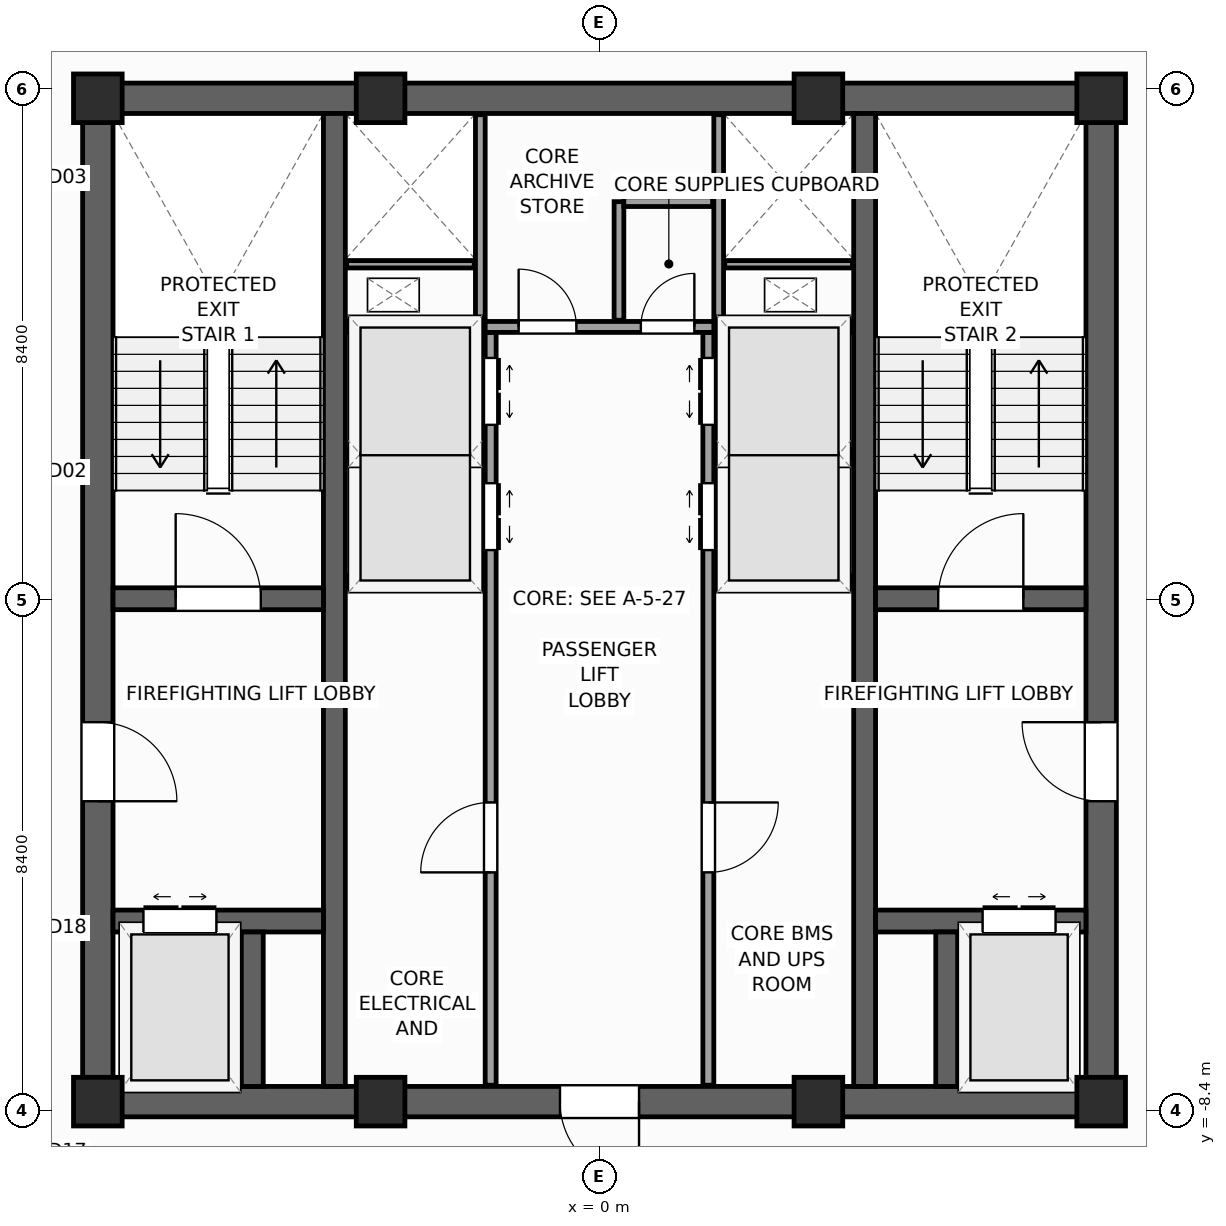
"""IFC4 building model, lengths in metres.
Left out: names, types, materials, properties, quantities, classifications, styles, units other than length and angle.
Written with IfcOpenShell. Run it as: python <this file> out.ifc"""

import sys

from ifc_helpers import new_model, si_unit, direction, frame, frame_2d, origin, origin_2d, place, context, subcontext, project, spatial, rectangle, extrude, source, transform, mapped, element, fill, save


model = new_model("IFC4")
c1 = context("Model", 3, precision=1e-05, world=origin(), true_north=direction((0.0, 1.0)))
c2 = subcontext(c1, "Body", "Model", "MODEL_VIEW")
j1 = project(units=[si_unit("LENGTHUNIT", "METRE"), si_unit("PLANEANGLEUNIT", "RADIAN")], contexts=[c1])
p1 = place(None, origin())
s1 = spatial("IfcSite", under=j1, at=p1, CompositionType="ELEMENT")
p2 = place(p1, origin())
s2 = spatial("IfcBuilding", under=s1, at=p2, CompositionType="ELEMENT")
p3 = place(p2, frame((0.0, 0.0, 265.2)))
s3 = spatial("IfcBuildingStorey", under=s2, at=p3, CompositionType="ELEMENT", Elevation=265.2)
p4 = place(p3, frame((-8.5, -8.25, 0.0), z_axis=(0.0, 0.0, 1.0), x_axis=(1.0, 0.0, 0.0)))
e1 = element("IfcWall", 1, at=p4, inside=s3, PredefinedType="SHEAR", context=c2, shape_type="SweptSolid", body=[
    extrude(rectangle(XDim=17.0, YDim=0.5, at=frame_2d((8.5, 0.0))), origin(), (0.0, 0.0, 1.0), 3.6),
])
p5 = place(p4, frame((7.85, 0.0, 0.0)))
e2 = element("IfcOpeningElement", 2, at=p5, cuts=e1, PredefinedType="OPENING", context=c2, shape_type="SweptSolid", body=[
    extrude(rectangle(XDim=1.3, YDim=2.2, at=frame_2d((0.65, 1.1))), frame((0.0, 0.26, 0.0), z_axis=(0.0, -1.0, 0.0), x_axis=(1.0, 0.0, 0.0)), (0.0, 0.0, 1.0), 0.52),
])
p6 = place(p3, frame((-8.5, 8.25, 0.0), z_axis=(0.0, 0.0, 1.0), x_axis=(1.0, 0.0, 0.0)))
e3 = element("IfcWall", 3, at=p6, inside=s3, PredefinedType="SHEAR", context=c2, shape_type="SweptSolid", body=[
    extrude(rectangle(XDim=17.0, YDim=0.5, at=frame_2d((8.5, 0.0))), origin(), (0.0, 0.0, 1.0), 3.6),
])
p7 = place(p3, frame((-8.25, -8.0, 0.0), z_axis=(0.0, 0.0, 1.0), x_axis=(0.0, 1.0, 0.0)))
e4 = element("IfcWall", 4, at=p7, inside=s3, PredefinedType="SHEAR", context=c2, shape_type="SweptSolid", body=[
    extrude(rectangle(XDim=16.0, YDim=0.5, at=frame_2d((8.0, 0.0))), origin(), (0.0, 0.0, 1.0), 3.6),
])
p8 = place(p7, frame((4.69, 0.0, 0.0)))
e5 = element("IfcOpeningElement", 5, at=p8, cuts=e4, PredefinedType="OPENING", context=c2, shape_type="SweptSolid", body=[
    extrude(rectangle(XDim=1.3, YDim=2.2, at=frame_2d((0.65, 1.1))), frame((0.0, 0.26, 0.0), z_axis=(0.0, -1.0, 0.0), x_axis=(1.0, 0.0, 0.0)), (0.0, 0.0, 1.0), 0.52),
])
p9 = place(p3, frame((8.25, -8.0, 0.0), z_axis=(0.0, 0.0, 1.0), x_axis=(0.0, 1.0, 0.0)))
e6 = element("IfcWall", 6, at=p9, inside=s3, PredefinedType="SHEAR", context=c2, shape_type="SweptSolid", body=[
    extrude(rectangle(XDim=16.0, YDim=0.5, at=frame_2d((8.0, 0.0))), origin(), (0.0, 0.0, 1.0), 3.6),
])
p10 = place(p9, frame((4.69, 0.0, 0.0)))
e7 = element("IfcOpeningElement", 7, at=p10, cuts=e6, PredefinedType="OPENING", context=c2, shape_type="SweptSolid", body=[
    extrude(rectangle(XDim=1.3, YDim=2.2, at=frame_2d((0.65, 1.1))), frame((0.0, 0.26, 0.0), z_axis=(0.0, -1.0, 0.0), x_axis=(1.0, 0.0, 0.0)), (0.0, 0.0, 1.0), 0.52),
])
for number, where, z_axis, x_axis in (
    (8, (-4.36, -8.0, 0.0), (0.0, 0.0, 1.0), (0.0, 1.0, 0.0)),
    (9, (4.36, -8.0, 0.0), (0.0, 0.0, 1.0), (0.0, 1.0, 0.0)),
):
    element("IfcWall", number, at=place(p3, frame(where, z_axis=z_axis, x_axis=x_axis)), inside=s3, PredefinedType="SHEAR", context=c2, shape_type="SweptSolid", body=[
        extrude(rectangle(XDim=16.0, YDim=0.36, at=frame_2d((8.0, 0.0))), origin(), (0.0, 0.0, 1.0), 3.6),
    ])
p11 = place(p3, frame((-8.0, 0.02, 0.0), z_axis=(0.0, 0.0, 1.0), x_axis=(1.0, 0.0, 0.0)))
e10 = element("IfcWall", 10, at=p11, inside=s3, PredefinedType="SHEAR", context=c2, shape_type="SweptSolid", body=[
    extrude(rectangle(XDim=3.46, YDim=0.36, at=frame_2d((1.73, 0.0))), origin(), (0.0, 0.0, 1.0), 3.6),
])
p12 = place(p11, frame((1.03, 0.0, 0.0)))
e11 = element("IfcOpeningElement", 11, at=p12, cuts=e10, PredefinedType="OPENING", context=c2, shape_type="SweptSolid", body=[
    extrude(rectangle(XDim=1.4, YDim=2.2, at=frame_2d((0.7, 1.1))), frame((0.0, 0.19, 0.0), z_axis=(0.0, -1.0, 0.0), x_axis=(1.0, 0.0, 0.0)), (0.0, 0.0, 1.0), 0.38),
])
p13 = place(p3, frame((4.54, 0.02, 0.0), z_axis=(0.0, 0.0, 1.0), x_axis=(1.0, 0.0, 0.0)))
e12 = element("IfcWall", 12, at=p13, inside=s3, PredefinedType="SHEAR", context=c2, shape_type="SweptSolid", body=[
    extrude(rectangle(XDim=3.46, YDim=0.36, at=frame_2d((1.73, 0.0))), origin(), (0.0, 0.0, 1.0), 3.6),
])
p14 = place(p13, frame((1.03, 0.0, 0.0)))
e13 = element("IfcOpeningElement", 13, at=p14, cuts=e12, PredefinedType="OPENING", context=c2, shape_type="SweptSolid", body=[
    extrude(rectangle(XDim=1.4, YDim=2.2, at=frame_2d((0.7, 1.1))), frame((0.0, 0.19, 0.0), z_axis=(0.0, -1.0, 0.0), x_axis=(1.0, 0.0, 0.0)), (0.0, 0.0, 1.0), 0.38),
])
p15 = place(p3, frame((-8.0, -5.28, 0.0), z_axis=(0.0, 0.0, 1.0), x_axis=(1.0, 0.0, 0.0)))
e14 = element("IfcWall", 14, at=p15, inside=s3, PredefinedType="SHEAR", context=c2, shape_type="SweptSolid", body=[
    extrude(rectangle(XDim=3.46, YDim=0.36, at=frame_2d((1.73, 0.0))), origin(), (0.0, 0.0, 1.0), 3.6),
])
p16 = place(p15, frame((0.5, 0.0, 0.0)))
e15 = element("IfcOpeningElement", 15, at=p16, cuts=e14, PredefinedType="OPENING", context=c2, shape_type="SweptSolid", body=[
    extrude(rectangle(XDim=1.2, YDim=2.25, at=frame_2d((0.6, 1.125))), frame((0.0, 0.19, 0.0), z_axis=(0.0, -1.0, 0.0), x_axis=(1.0, 0.0, 0.0)), (0.0, 0.0, 1.0), 0.38),
])
p17 = place(p3, frame((4.54, -5.28, 0.0), z_axis=(0.0, 0.0, 1.0), x_axis=(1.0, 0.0, 0.0)))
e16 = element("IfcWall", 16, at=p17, inside=s3, PredefinedType="SHEAR", context=c2, shape_type="SweptSolid", body=[
    extrude(rectangle(XDim=3.46, YDim=0.36, at=frame_2d((1.73, 0.0))), origin(), (0.0, 0.0, 1.0), 3.6),
])
p18 = place(p17, frame((1.76, 0.0, 0.0)))
e17 = element("IfcOpeningElement", 17, at=p18, cuts=e16, PredefinedType="OPENING", context=c2, shape_type="SweptSolid", body=[
    extrude(rectangle(XDim=1.2, YDim=2.25, at=frame_2d((0.6, 1.125))), frame((0.0, 0.19, 0.0), z_axis=(0.0, -1.0, 0.0), x_axis=(1.0, 0.0, 0.0)), (0.0, 0.0, 1.0), 0.38),
])
for number, where, z_axis, x_axis in (
    (18, (-5.71, -8.0, 0.0), (0.0, 0.0, 1.0), (0.0, 1.0, 0.0)),
    (19, (5.71, -8.0, 0.0), (0.0, 0.0, 1.0), (0.0, 1.0, 0.0)),
):
    element("IfcWall", number, at=place(p3, frame(where, z_axis=z_axis, x_axis=x_axis)), inside=s3, PredefinedType="SHEAR", context=c2, shape_type="SweptSolid", body=[
        extrude(rectangle(XDim=2.54, YDim=0.36, at=frame_2d((1.27, 0.0))), origin(), (0.0, 0.0, 1.0), 3.6),
    ])
m1 = source(origin(), c2, "Body", "SweptSolid", [
    extrude(rectangle(XDim=0.8, YDim=0.8, at=origin_2d()), origin(), (0.0, 0.0, 1.0), 3.6),
])
for number, where, z_axis, x_axis in (
    (20, (-8.25, -8.25, 0.0), (0.0, 0.0, 1.0), (1.0, 0.0, 0.0)),
    (21, (8.25, -8.25, 0.0), (0.0, 0.0, 1.0), (1.0, 0.0, 0.0)),
    (22, (8.25, 8.25, 0.0), (0.0, 0.0, 1.0), (1.0, 0.0, 0.0)),
    (23, (-8.25, 8.25, 0.0), (0.0, 0.0, 1.0), (1.0, 0.0, 0.0)),
    (24, (-3.6, -8.25, 0.0), (0.0, 0.0, 1.0), (1.0, 0.0, 0.0)),
    (25, (3.6, -8.25, 0.0), (0.0, 0.0, 1.0), (1.0, 0.0, 0.0)),
    (26, (-3.6, 8.25, 0.0), (0.0, 0.0, 1.0), (1.0, 0.0, 0.0)),
    (27, (3.6, 8.25, 0.0), (0.0, 0.0, 1.0), (1.0, 0.0, 0.0)),
):
    element("IfcColumn", number, at=place(p3, frame(where, z_axis=z_axis, x_axis=x_axis)), inside=s3, PredefinedType="PILASTER", context=c2, shape_type="MappedRepresentation", body=[
        mapped(m1, transform((0.0, 0.0, 0.0), scale=1.0)),
    ])
p19 = place(p3, frame((-1.79, -7.98, 0.0), z_axis=(0.0, 0.0, 1.0), x_axis=(0.0, 1.0, 0.0)))
e28 = element("IfcWall", 28, at=p19, inside=s3, PredefinedType="PARTITIONING", context=c2, shape_type="SweptSolid", body=[
    extrude(rectangle(XDim=12.38, YDim=0.18, at=frame_2d((6.19, 0.0))), origin(), (0.0, 0.0, 1.0), 3.35),
])
p20 = place(p19, frame((8.8, 0.0, 0.0)))
e29 = element("IfcOpeningElement", 29, at=p20, cuts=e28, PredefinedType="OPENING", context=c2, shape_type="SweptSolid", body=[
    extrude(rectangle(XDim=1.1, YDim=2.2, at=frame_2d((0.55, 1.1))), frame((0.0, 0.1, 0.0), z_axis=(0.0, -1.0, 0.0), x_axis=(1.0, 0.0, 0.0)), (0.0, 0.0, 1.0), 0.2),
])
p21 = place(p19, frame((10.86, 0.0, 0.0)))
e30 = element("IfcOpeningElement", 30, at=p21, cuts=e28, PredefinedType="OPENING", context=c2, shape_type="SweptSolid", body=[
    extrude(rectangle(XDim=1.1, YDim=2.2, at=frame_2d((0.55, 1.1))), frame((0.0, 0.1, 0.0), z_axis=(0.0, -1.0, 0.0), x_axis=(1.0, 0.0, 0.0)), (0.0, 0.0, 1.0), 0.2),
])
p22 = place(p19, frame((3.5, 0.0, 0.0)))
e31 = element("IfcOpeningElement", 31, at=p22, cuts=e28, PredefinedType="OPENING", context=c2, shape_type="SweptSolid", body=[
    extrude(rectangle(XDim=1.15, YDim=2.25, at=frame_2d((0.575, 1.125))), frame((0.0, 0.1, 0.0), z_axis=(0.0, -1.0, 0.0), x_axis=(1.0, 0.0, 0.0)), (0.0, 0.0, 1.0), 0.2),
])
p23 = place(p3, frame((1.79, -7.98, 0.0), z_axis=(0.0, 0.0, 1.0), x_axis=(0.0, 1.0, 0.0)))
e32 = element("IfcWall", 32, at=p23, inside=s3, PredefinedType="PARTITIONING", context=c2, shape_type="SweptSolid", body=[
    extrude(rectangle(XDim=12.38, YDim=0.18, at=frame_2d((6.19, 0.0))), origin(), (0.0, 0.0, 1.0), 3.35),
])
p24 = place(p23, frame((8.8, 0.0, 0.0)))
e33 = element("IfcOpeningElement", 33, at=p24, cuts=e32, PredefinedType="OPENING", context=c2, shape_type="SweptSolid", body=[
    extrude(rectangle(XDim=1.1, YDim=2.2, at=frame_2d((0.55, 1.1))), frame((0.0, 0.1, 0.0), z_axis=(0.0, -1.0, 0.0), x_axis=(1.0, 0.0, 0.0)), (0.0, 0.0, 1.0), 0.2),
])
p25 = place(p23, frame((10.86, 0.0, 0.0)))
e34 = element("IfcOpeningElement", 34, at=p25, cuts=e32, PredefinedType="OPENING", context=c2, shape_type="SweptSolid", body=[
    extrude(rectangle(XDim=1.1, YDim=2.2, at=frame_2d((0.55, 1.1))), frame((0.0, 0.1, 0.0), z_axis=(0.0, -1.0, 0.0), x_axis=(1.0, 0.0, 0.0)), (0.0, 0.0, 1.0), 0.2),
])
p26 = place(p23, frame((3.5, 0.0, 0.0)))
e35 = element("IfcOpeningElement", 35, at=p26, cuts=e32, PredefinedType="OPENING", context=c2, shape_type="SweptSolid", body=[
    extrude(rectangle(XDim=1.15, YDim=2.25, at=frame_2d((0.575, 1.125))), frame((0.0, 0.1, 0.0), z_axis=(0.0, -1.0, 0.0), x_axis=(1.0, 0.0, 0.0)), (0.0, 0.0, 1.0), 0.2),
])
p27 = place(p3, frame((-1.88, 4.49, 0.0), z_axis=(0.0, 0.0, 1.0), x_axis=(1.0, 0.0, 0.0)))
e36 = element("IfcWall", 36, at=p27, inside=s3, PredefinedType="PARTITIONING", context=c2, shape_type="SweptSolid", body=[
    extrude(rectangle(XDim=3.76, YDim=0.18, at=frame_2d((1.88, 0.0))), origin(), (0.0, 0.0, 1.0), 3.35),
])
p28 = place(p27, frame((0.55, 0.0, 0.0)))
e37 = element("IfcOpeningElement", 37, at=p28, cuts=e36, PredefinedType="OPENING", context=c2, shape_type="SweptSolid", body=[
    extrude(rectangle(XDim=0.95, YDim=2.1, at=frame_2d((0.475, 1.05))), frame((0.0, 0.1, 0.0), z_axis=(0.0, -1.0, 0.0), x_axis=(1.0, 0.0, 0.0)), (0.0, 0.0, 1.0), 0.2),
])
p29 = place(p27, frame((2.56, 0.0, 0.0)))
e38 = element("IfcOpeningElement", 38, at=p29, cuts=e36, PredefinedType="OPENING", context=c2, shape_type="SweptSolid", body=[
    extrude(rectangle(XDim=0.88, YDim=2.1, at=frame_2d((0.44, 1.05))), frame((0.0, 0.1, 0.0), z_axis=(0.0, -1.0, 0.0), x_axis=(1.0, 0.0, 0.0)), (0.0, 0.0, 1.0), 0.2),
])
for number, where, z_axis, x_axis in (
    (39, (-4.17, 0.3, 0.0), (0.0, 0.0, 1.0), (1.0, 0.0, 0.0)),
    (40, (1.89, 0.3, 0.0), (0.0, 0.0, 1.0), (1.0, 0.0, 0.0)),
    (41, (-4.17, 4.49, 0.0), (0.0, 0.0, 1.0), (1.0, 0.0, 0.0)),
    (42, (1.89, 4.49, 0.0), (0.0, 0.0, 1.0), (1.0, 0.0, 0.0)),
):
    element("IfcWall", number, at=place(p3, frame(where, z_axis=z_axis, x_axis=x_axis)), inside=s3, PredefinedType="PARTITIONING", context=c2, shape_type="SweptSolid", body=[
        extrude(rectangle(XDim=2.28, YDim=0.18, at=frame_2d((1.14, 0.0))), origin(), (0.0, 0.0, 1.0), 3.35),
    ])
for number, where, z_axis, x_axis in (
    (43, (-4.16, 2.4, 0.0), (0.0, 0.0, 1.0), (1.0, 0.0, 0.0)),
    (44, (1.9, 2.4, 0.0), (0.0, 0.0, 1.0), (1.0, 0.0, 0.0)),
):
    element("IfcWall", number, at=place(p3, frame(where, z_axis=z_axis, x_axis=x_axis)), inside=s3, PredefinedType="PARTITIONING", context=c2, shape_type="SweptSolid", body=[
        extrude(rectangle(XDim=2.26, YDim=0.12, at=frame_2d((1.13, 0.0))), origin(), (0.0, 0.0, 1.0), 3.35),
    ])
for number, where, z_axis, x_axis in (
    (45, (-1.96, 4.58, 0.0), (0.0, 0.0, 1.0), (0.0, 1.0, 0.0)),
    (46, (1.96, 4.58, 0.0), (0.0, 0.0, 1.0), (0.0, 1.0, 0.0)),
):
    element("IfcWall", number, at=place(p3, frame(where, z_axis=z_axis, x_axis=x_axis)), inside=s3, PredefinedType="PARTITIONING", context=c2, shape_type="SweptSolid", body=[
        extrude(rectangle(XDim=3.4, YDim=0.16, at=frame_2d((1.7, 0.0))), origin(), (0.0, 0.0, 1.0), 3.35),
    ])
for number, where, z_axis, x_axis in (
    (47, (-4.16, 5.52, 0.0), (0.0, 0.0, 1.0), (1.0, 0.0, 0.0)),
    (48, (2.06, 5.52, 0.0), (0.0, 0.0, 1.0), (1.0, 0.0, 0.0)),
):
    element("IfcWall", number, at=place(p3, frame(where, z_axis=z_axis, x_axis=x_axis)), inside=s3, PredefinedType="PARTITIONING", context=c2, shape_type="SweptSolid", body=[
        extrude(rectangle(XDim=2.1, YDim=0.12, at=frame_2d((1.05, 0.0))), origin(), (0.0, 0.0, 1.0), 3.35),
    ])
p30 = place(p3, frame((0.32, 4.6, 0.0), z_axis=(0.0, 0.0, 1.0), x_axis=(0.0, 1.0, 0.0)))
e49 = element("IfcWall", 49, at=p30, inside=s3, PredefinedType="PARTITIONING", context=c2, shape_type="SweptSolid", body=[
    extrude(rectangle(XDim=1.95, YDim=0.16, at=frame_2d((0.975, 0.0))), origin(), (0.0, 0.0, 1.0), 3.35),
])
p31 = place(p3, frame((0.4, 6.55, 0.0), z_axis=(0.0, 0.0, 1.0), x_axis=(1.0, 0.0, 0.0)))
e50 = element("IfcWall", 50, at=p31, inside=s3, PredefinedType="PARTITIONING", context=c2, shape_type="SweptSolid", body=[
    extrude(rectangle(XDim=1.46, YDim=0.16, at=frame_2d((0.73, 0.0))), origin(), (0.0, 0.0, 1.0), 3.35),
])
m2 = source(origin(), c2, "Body", "SweptSolid", [
    extrude(rectangle(XDim=1.4, YDim=2.2, at=frame_2d((0.7, 1.1))), frame((0.0, 0.025, 0.0), z_axis=(0.0, -1.0, 0.0), x_axis=(1.0, 0.0, 0.0)), (0.0, 0.0, 1.0), 0.05),
])
p32 = place(p12, origin())
e51 = element("IfcDoor", 51, at=p32, inside=s3, OperationType="SINGLE_SWING_LEFT", PredefinedType="DOOR", context=c2, shape_type="MappedRepresentation", body=[
    mapped(m2, transform((0.0, 0.0, 0.0), scale=1.0)),
])
fill(e11, e51)
p33 = place(p14, origin())
e52 = element("IfcDoor", 52, at=p33, inside=s3, OperationType="SINGLE_SWING_RIGHT", PredefinedType="DOOR", context=c2, shape_type="MappedRepresentation", body=[
    mapped(m2, transform((0.0, 0.0, 0.0), scale=1.0)),
])
fill(e13, e52)
m3 = source(origin(), c2, "Body", "SweptSolid", [
    extrude(rectangle(XDim=1.3, YDim=2.2, at=frame_2d((0.65, 1.1))), frame((0.0, 0.025, 0.0), z_axis=(0.0, -1.0, 0.0), x_axis=(1.0, 0.0, 0.0)), (0.0, 0.0, 1.0), 0.05),
])
p34 = place(p8, frame((1.3, 0.0, 0.0), z_axis=(0.0, 0.0, 1.0), x_axis=(-1.0, 0.0, 0.0)))
e53 = element("IfcDoor", 53, at=p34, inside=s3, OperationType="SINGLE_SWING_LEFT", PredefinedType="DOOR", context=c2, shape_type="MappedRepresentation", body=[
    mapped(m3, transform((0.0, 0.0, 0.0), scale=1.0)),
])
fill(e5, e53)
p35 = place(p10, origin())
e54 = element("IfcDoor", 54, at=p35, inside=s3, OperationType="SINGLE_SWING_RIGHT", PredefinedType="DOOR", context=c2, shape_type="MappedRepresentation", body=[
    mapped(m3, transform((0.0, 0.0, 0.0), scale=1.0)),
])
fill(e7, e54)
p36 = place(p5, frame((1.3, 0.0, 0.0), z_axis=(0.0, 0.0, 1.0), x_axis=(-1.0, 0.0, 0.0)))
e55 = element("IfcDoor", 55, at=p36, inside=s3, OperationType="SINGLE_SWING_RIGHT", PredefinedType="DOOR", context=c2, shape_type="MappedRepresentation", body=[
    mapped(m3, transform((0.0, 0.0, 0.0), scale=1.0)),
])
fill(e2, e55)
m4 = source(origin(), c2, "Body", "SweptSolid", [
    extrude(rectangle(XDim=1.2, YDim=2.25, at=frame_2d((0.6, 1.125))), frame((0.0, 0.025, 0.0), z_axis=(0.0, -1.0, 0.0), x_axis=(1.0, 0.0, 0.0)), (0.0, 0.0, 1.0), 0.05),
])
p37 = place(p16, origin())
e56 = element("IfcDoor", 56, at=p37, inside=s3, OperationType="DOUBLE_DOOR_SLIDING", PredefinedType="DOOR", context=c2, shape_type="MappedRepresentation", body=[
    mapped(m4, transform((0.0, 0.0, 0.0), scale=1.0)),
])
fill(e15, e56)
p38 = place(p18, origin())
e57 = element("IfcDoor", 57, at=p38, inside=s3, OperationType="DOUBLE_DOOR_SLIDING", PredefinedType="DOOR", context=c2, shape_type="MappedRepresentation", body=[
    mapped(m4, transform((0.0, 0.0, 0.0), scale=1.0)),
])
fill(e17, e57)
m5 = source(origin(), c2, "Body", "SweptSolid", [
    extrude(rectangle(XDim=1.1, YDim=2.2, at=frame_2d((0.55, 1.1))), frame((0.0, 0.025, 0.0), z_axis=(0.0, -1.0, 0.0), x_axis=(1.0, 0.0, 0.0)), (0.0, 0.0, 1.0), 0.05),
])
p39 = place(p20, frame((1.1, 0.0, 0.0), z_axis=(0.0, 0.0, 1.0), x_axis=(-1.0, 0.0, 0.0)))
e58 = element("IfcDoor", 58, at=p39, inside=s3, OperationType="DOUBLE_DOOR_SLIDING", PredefinedType="DOOR", context=c2, shape_type="MappedRepresentation", body=[
    mapped(m5, transform((0.0, 0.0, 0.0), scale=1.0)),
])
fill(e29, e58)
p40 = place(p21, frame((1.1, 0.0, 0.0), z_axis=(0.0, 0.0, 1.0), x_axis=(-1.0, 0.0, 0.0)))
e59 = element("IfcDoor", 59, at=p40, inside=s3, OperationType="DOUBLE_DOOR_SLIDING", PredefinedType="DOOR", context=c2, shape_type="MappedRepresentation", body=[
    mapped(m5, transform((0.0, 0.0, 0.0), scale=1.0)),
])
fill(e30, e59)
p41 = place(p24, origin())
e60 = element("IfcDoor", 60, at=p41, inside=s3, OperationType="DOUBLE_DOOR_SLIDING", PredefinedType="DOOR", context=c2, shape_type="MappedRepresentation", body=[
    mapped(m5, transform((0.0, 0.0, 0.0), scale=1.0)),
])
fill(e33, e60)
p42 = place(p25, origin())
e61 = element("IfcDoor", 61, at=p42, inside=s3, OperationType="DOUBLE_DOOR_SLIDING", PredefinedType="DOOR", context=c2, shape_type="MappedRepresentation", body=[
    mapped(m5, transform((0.0, 0.0, 0.0), scale=1.0)),
])
fill(e34, e61)
m6 = source(origin(), c2, "Body", "SweptSolid", [
    extrude(rectangle(XDim=1.15, YDim=2.25, at=frame_2d((0.575, 1.125))), frame((0.0, 0.025, 0.0), z_axis=(0.0, -1.0, 0.0), x_axis=(1.0, 0.0, 0.0)), (0.0, 0.0, 1.0), 0.05),
])
p43 = place(p22, origin())
e62 = element("IfcDoor", 62, at=p43, inside=s3, OperationType="SINGLE_SWING_LEFT", PredefinedType="DOOR", context=c2, shape_type="MappedRepresentation", body=[
    mapped(m6, transform((0.0, 0.0, 0.0), scale=1.0)),
])
fill(e31, e62)
p44 = place(p26, frame((1.15, 0.0, 0.0), z_axis=(0.0, 0.0, 1.0), x_axis=(-1.0, 0.0, 0.0)))
e63 = element("IfcDoor", 63, at=p44, inside=s3, OperationType="SINGLE_SWING_RIGHT", PredefinedType="DOOR", context=c2, shape_type="MappedRepresentation", body=[
    mapped(m6, transform((0.0, 0.0, 0.0), scale=1.0)),
])
fill(e35, e63)
m7 = source(origin(), c2, "Body", "SweptSolid", [
    extrude(rectangle(XDim=0.95, YDim=2.1, at=frame_2d((0.475, 1.05))), frame((0.0, 0.025, 0.0), z_axis=(0.0, -1.0, 0.0), x_axis=(1.0, 0.0, 0.0)), (0.0, 0.0, 1.0), 0.05),
])
p45 = place(p28, origin())
e64 = element("IfcDoor", 64, at=p45, inside=s3, OperationType="SINGLE_SWING_LEFT", PredefinedType="DOOR", context=c2, shape_type="MappedRepresentation", body=[
    mapped(m7, transform((0.0, 0.0, 0.0), scale=1.0)),
])
fill(e37, e64)
m8 = source(origin(), c2, "Body", "SweptSolid", [
    extrude(rectangle(XDim=0.88, YDim=2.1, at=frame_2d((0.44, 1.05))), frame((0.0, 0.025, 0.0), z_axis=(0.0, -1.0, 0.0), x_axis=(1.0, 0.0, 0.0)), (0.0, 0.0, 1.0), 0.05),
])
p46 = place(p29, origin())
e65 = element("IfcDoor", 65, at=p46, inside=s3, OperationType="SINGLE_SWING_RIGHT", PredefinedType="DOOR", context=c2, shape_type="MappedRepresentation", body=[
    mapped(m8, transform((0.0, 0.0, 0.0), scale=1.0)),
])
fill(e38, e65)
save(model, sys.argv[1])
